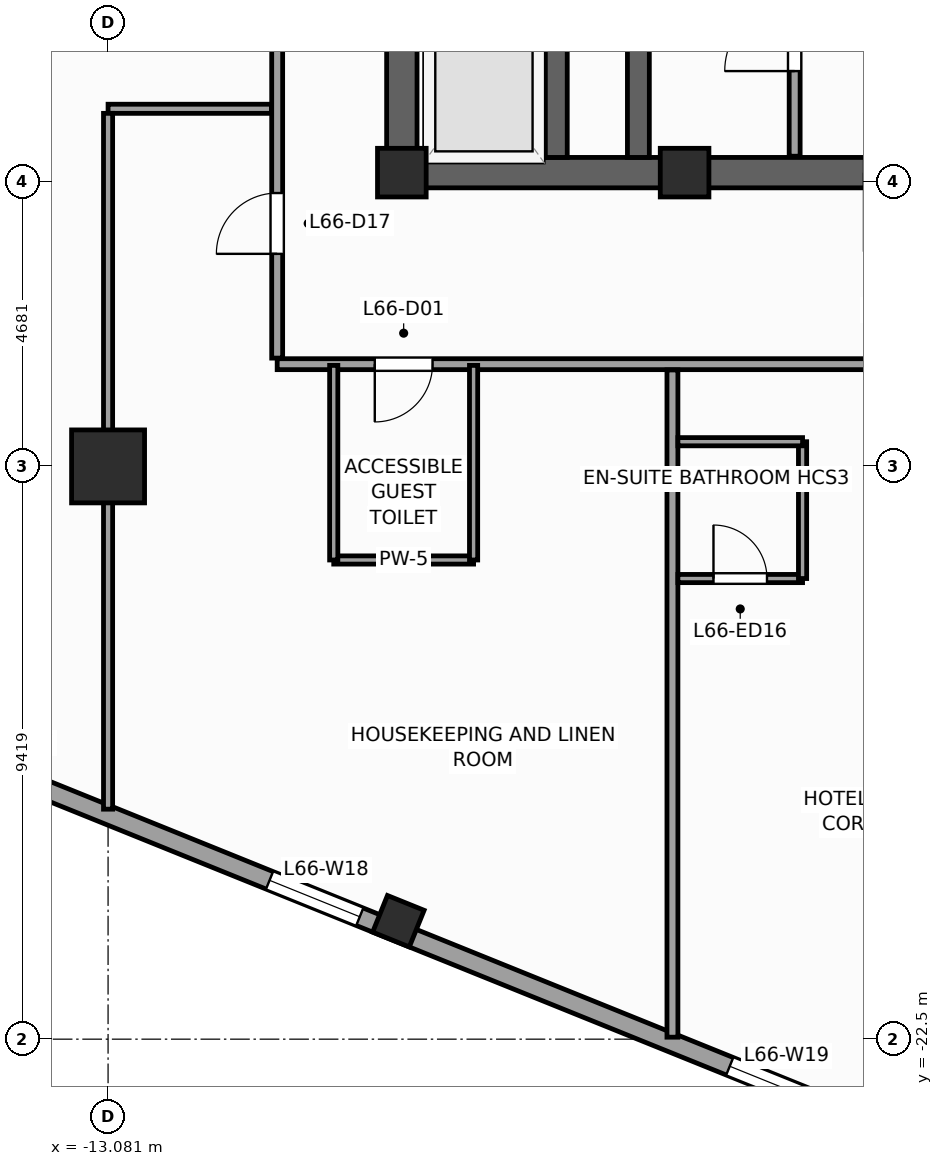
"""IFC4 building model, lengths in metres.
Left out: names, types, materials, properties, quantities, classifications, styles, units other than length and angle.
Written with IfcOpenShell. Run it as: python <this file> out.ifc"""

import sys

from ifc_helpers import new_model, si_unit, direction, frame, frame_2d, origin, origin_2d, place, context, subcontext, project, spatial, rectangle, extrude, source, transform, mapped, element, fill, save


model = new_model("IFC4")
c1 = context("Model", 3, precision=1e-05, world=origin(), true_north=direction((0.0, 1.0)))
c2 = subcontext(c1, "Body", "Model", "MODEL_VIEW")
j1 = project(units=[si_unit("LENGTHUNIT", "METRE"), si_unit("PLANEANGLEUNIT", "RADIAN")], contexts=[c1])
p1 = place(None, origin())
s1 = spatial("IfcSite", under=j1, at=p1, CompositionType="ELEMENT")
p2 = place(p1, origin())
s2 = spatial("IfcBuilding", under=s1, at=p2, CompositionType="ELEMENT")
p3 = place(p2, frame((0.0, 0.0, 272.4)))
s3 = spatial("IfcBuildingStorey", under=s2, at=p3, CompositionType="ELEMENT", Elevation=272.4)
p4 = place(p3, frame((-8.5, -8.25, 0.0), z_axis=(0.0, 0.0, 1.0), x_axis=(1.0, 0.0, 0.0)))
e1 = element("IfcWall", 1, at=p4, inside=s3, PredefinedType="SHEAR", context=c2, shape_type="SweptSolid", body=[
    extrude(rectangle(XDim=17.0, YDim=0.5, at=frame_2d((8.5, 0.0))), origin(), (0.0, 0.0, 1.0), 3.6),
])
p5 = place(p4, frame((7.85, 0.0, 0.0)))
e2 = element("IfcOpeningElement", 2, at=p5, cuts=e1, PredefinedType="OPENING", context=c2, shape_type="SweptSolid", body=[
    extrude(rectangle(XDim=1.3, YDim=2.2, at=frame_2d((0.65, 1.1))), frame((0.0, 0.26, 0.0), z_axis=(0.0, -1.0, 0.0), x_axis=(1.0, 0.0, 0.0)), (0.0, 0.0, 1.0), 0.52),
])
p6 = place(p3, frame((-8.25, -8.0, 0.0), z_axis=(0.0, 0.0, 1.0), x_axis=(0.0, 1.0, 0.0)))
e3 = element("IfcWall", 3, at=p6, inside=s3, PredefinedType="SHEAR", context=c2, shape_type="SweptSolid", body=[
    extrude(rectangle(XDim=16.0, YDim=0.5, at=frame_2d((8.0, 0.0))), origin(), (0.0, 0.0, 1.0), 3.6),
])
p7 = place(p6, frame((4.69, 0.0, 0.0)))
e4 = element("IfcOpeningElement", 4, at=p7, cuts=e3, PredefinedType="OPENING", context=c2, shape_type="SweptSolid", body=[
    extrude(rectangle(XDim=1.3, YDim=2.2, at=frame_2d((0.65, 1.1))), frame((0.0, 0.26, 0.0), z_axis=(0.0, -1.0, 0.0), x_axis=(1.0, 0.0, 0.0)), (0.0, 0.0, 1.0), 0.52),
])
p8 = place(p3, frame((-4.36, -8.0, 0.0), z_axis=(0.0, 0.0, 1.0), x_axis=(0.0, 1.0, 0.0)))
e5 = element("IfcWall", 5, at=p8, inside=s3, PredefinedType="SHEAR", context=c2, shape_type="SweptSolid", body=[
    extrude(rectangle(XDim=16.0, YDim=0.36, at=frame_2d((8.0, 0.0))), origin(), (0.0, 0.0, 1.0), 3.6),
])
p9 = place(p3, frame((-5.71, -8.0, 0.0), z_axis=(0.0, 0.0, 1.0), x_axis=(0.0, 1.0, 0.0)))
e6 = element("IfcWall", 6, at=p9, inside=s3, PredefinedType="SHEAR", context=c2, shape_type="SweptSolid", body=[
    extrude(rectangle(XDim=2.54, YDim=0.36, at=frame_2d((1.27, 0.0))), origin(), (0.0, 0.0, 1.0), 3.6),
])
m1 = source(origin(), c2, "Body", "SweptSolid", [
    extrude(rectangle(XDim=0.8, YDim=0.8, at=origin_2d()), origin(), (0.0, 0.0, 1.0), 3.6),
])
for number, where, z_axis, x_axis in (
    (7, (-8.25, -8.25, 0.0), (0.0, 0.0, 1.0), (1.0, 0.0, 0.0)),
    (8, (-3.6, -8.25, 0.0), (0.0, 0.0, 1.0), (1.0, 0.0, 0.0)),
):
    element("IfcColumn", number, at=place(p3, frame(where, z_axis=z_axis, x_axis=x_axis)), inside=s3, PredefinedType="PILASTER", context=c2, shape_type="MappedRepresentation", body=[
        mapped(m1, transform((0.0, 0.0, 0.0), scale=1.0)),
    ])
m2 = source(origin(), c2, "Body", "SweptSolid", [
    extrude(rectangle(XDim=1.2, YDim=1.2, at=origin_2d()), origin(), (0.0, 0.0, 1.0), 3.6),
])
p10 = place(p3, frame((-13.081, -13.081, 0.0), z_axis=(0.0, 0.0, 1.0), x_axis=(1.0, 0.0, 0.0)))
e9 = element("IfcColumn", 9, at=p10, inside=s3, PredefinedType="COLUMN", context=c2, shape_type="MappedRepresentation", body=[
    mapped(m2, transform((0.0, 0.0, 0.0), scale=1.0)),
])
m3 = source(origin(), c2, "Body", "SweptSolid", [
    extrude(rectangle(XDim=0.65, YDim=0.65, at=origin_2d()), origin(), (0.0, 0.0, 1.0), 3.6),
])
p11 = place(p3, frame((-8.307, -20.56, 0.0), z_axis=(0.0, 0.0, 1.0), x_axis=(0.374606593416, 0.927183854567, 0.0)))
e10 = element("IfcColumn", 10, at=p11, inside=s3, PredefinedType="COLUMN", context=c2, shape_type="MappedRepresentation", body=[
    mapped(m3, transform((0.0, 0.0, 0.0), scale=1.0)),
])
p12 = place(p3, frame((-23.813, -14.479, 0.0), z_axis=(0.0, 0.0, 1.0), x_axis=(0.927182657188, -0.374609557019, 0.0)))
e11 = element("IfcWall", 11, at=p12, inside=s3, PredefinedType="STANDARD", context=c2, shape_type="SweptSolid", body=[
    extrude(rectangle(XDim=33.31, YDim=0.31, at=frame_2d((16.655, 0.0))), origin(), (0.0, 0.0, 1.0), 2.75),
])
p13 = place(p12, frame((3.197, 0.0, 0.47)))
e12 = element("IfcOpeningElement", 12, at=p13, cuts=e11, PredefinedType="OPENING", context=c2, shape_type="SweptSolid", body=[
    extrude(rectangle(XDim=1.6, YDim=2.1, at=frame_2d((0.8, 1.05))), frame((0.0, 0.165, 0.0), z_axis=(0.0, -1.0, 0.0), x_axis=(1.0, 0.0, 0.0)), (0.0, 0.0, 1.0), 0.33),
])
p14 = place(p12, frame((8.86, 0.0, 0.47)))
e13 = element("IfcOpeningElement", 13, at=p14, cuts=e11, PredefinedType="OPENING", context=c2, shape_type="SweptSolid", body=[
    extrude(rectangle(XDim=1.6, YDim=2.1, at=frame_2d((0.8, 1.05))), frame((0.0, 0.165, 0.0), z_axis=(0.0, -1.0, 0.0), x_axis=(1.0, 0.0, 0.0)), (0.0, 0.0, 1.0), 0.33),
])
p15 = place(p12, frame((14.439, 0.0, 0.47)))
e14 = element("IfcOpeningElement", 14, at=p15, cuts=e11, PredefinedType="OPENING", context=c2, shape_type="SweptSolid", body=[
    extrude(rectangle(XDim=1.6, YDim=2.1, at=frame_2d((0.8, 1.05))), frame((0.0, 0.165, 0.0), z_axis=(0.0, -1.0, 0.0), x_axis=(1.0, 0.0, 0.0)), (0.0, 0.0, 1.0), 0.33),
])
p16 = place(p12, frame((22.601, 0.0, 0.47)))
e15 = element("IfcOpeningElement", 15, at=p16, cuts=e11, PredefinedType="OPENING", context=c2, shape_type="SweptSolid", body=[
    extrude(rectangle(XDim=1.6, YDim=2.1, at=frame_2d((0.8, 1.05))), frame((0.0, 0.165, 0.0), z_axis=(0.0, -1.0, 0.0), x_axis=(1.0, 0.0, 0.0)), (0.0, 0.0, 1.0), 0.33),
])
p17 = place(p12, frame((27.097, 0.0, 0.47)))
e16 = element("IfcOpeningElement", 16, at=p17, cuts=e11, PredefinedType="OPENING", context=c2, shape_type="SweptSolid", body=[
    extrude(rectangle(XDim=1.6, YDim=2.1, at=frame_2d((0.8, 1.05))), frame((0.0, 0.165, 0.0), z_axis=(0.0, -1.0, 0.0), x_axis=(1.0, 0.0, 0.0)), (0.0, 0.0, 1.0), 0.33),
])
p18 = place(p3, frame((-1.79, -7.98, 0.0), z_axis=(0.0, 0.0, 1.0), x_axis=(0.0, 1.0, 0.0)))
e17 = element("IfcWall", 17, at=p18, inside=s3, PredefinedType="PARTITIONING", context=c2, shape_type="SweptSolid", body=[
    extrude(rectangle(XDim=12.38, YDim=0.18, at=frame_2d((6.19, 0.0))), origin(), (0.0, 0.0, 1.0), 3.35),
])
p19 = place(p18, frame((8.8, 0.0, 0.0)))
e18 = element("IfcOpeningElement", 18, at=p19, cuts=e17, PredefinedType="OPENING", context=c2, shape_type="SweptSolid", body=[
    extrude(rectangle(XDim=1.1, YDim=2.2, at=frame_2d((0.55, 1.1))), frame((0.0, 0.1, 0.0), z_axis=(0.0, -1.0, 0.0), x_axis=(1.0, 0.0, 0.0)), (0.0, 0.0, 1.0), 0.2),
])
p20 = place(p18, frame((10.86, 0.0, 0.0)))
e19 = element("IfcOpeningElement", 19, at=p20, cuts=e17, PredefinedType="OPENING", context=c2, shape_type="SweptSolid", body=[
    extrude(rectangle(XDim=1.1, YDim=2.2, at=frame_2d((0.55, 1.1))), frame((0.0, 0.1, 0.0), z_axis=(0.0, -1.0, 0.0), x_axis=(1.0, 0.0, 0.0)), (0.0, 0.0, 1.0), 0.2),
])
p21 = place(p18, frame((1.4, 0.0, 0.0)))
e20 = element("IfcOpeningElement", 20, at=p21, cuts=e17, PredefinedType="OPENING", context=c2, shape_type="SweptSolid", body=[
    extrude(rectangle(XDim=1.15, YDim=2.25, at=frame_2d((0.575, 1.125))), frame((0.0, 0.1, 0.0), z_axis=(0.0, -1.0, 0.0), x_axis=(1.0, 0.0, 0.0)), (0.0, 0.0, 1.0), 0.2),
])
p22 = place(p18, frame((5.6, 0.0, 0.0)))
e21 = element("IfcOpeningElement", 21, at=p22, cuts=e17, PredefinedType="OPENING", context=c2, shape_type="SweptSolid", body=[
    extrude(rectangle(XDim=1.15, YDim=2.25, at=frame_2d((0.575, 1.125))), frame((0.0, 0.1, 0.0), z_axis=(0.0, -1.0, 0.0), x_axis=(1.0, 0.0, 0.0)), (0.0, 0.0, 1.0), 0.2),
])
p23 = place(p3, frame((-10.3, -11.4, 0.0), z_axis=(0.0, 0.0, 1.0), x_axis=(1.0, 0.0, 0.0)))
e22 = element("IfcWall", 22, at=p23, inside=s3, PredefinedType="PARTITIONING", context=c2, shape_type="SweptSolid", body=[
    extrude(rectangle(XDim=21.7, YDim=0.18, at=frame_2d((10.85, 0.0))), origin(), (0.0, 0.0, 1.0), 3.35),
])
p24 = place(p23, frame((1.605, 0.0, 0.0)))
e23 = element("IfcOpeningElement", 23, at=p24, cuts=e22, PredefinedType="OPENING", context=c2, shape_type="SweptSolid", body=[
    extrude(rectangle(XDim=0.95, YDim=2.1, at=frame_2d((0.475, 1.05))), frame((0.0, 0.1, 0.0), z_axis=(0.0, -1.0, 0.0), x_axis=(1.0, 0.0, 0.0)), (0.0, 0.0, 1.0), 0.2),
])
p25 = place(p23, frame((17.236, 0.0, 0.0)))
e24 = element("IfcOpeningElement", 24, at=p25, cuts=e22, PredefinedType="OPENING", context=c2, shape_type="SweptSolid", body=[
    extrude(rectangle(XDim=1.0, YDim=2.15, at=frame_2d((0.5, 1.075))), frame((0.0, 0.1, 0.0), z_axis=(0.0, -1.0, 0.0), x_axis=(1.0, 0.0, 0.0)), (0.0, 0.0, 1.0), 0.2),
])
p26 = place(p23, frame((9.8, 0.0, 0.0)))
e25 = element("IfcOpeningElement", 25, at=p26, cuts=e22, PredefinedType="OPENING", context=c2, shape_type="SweptSolid", body=[
    extrude(rectangle(XDim=1.0, YDim=2.15, at=frame_2d((0.5, 1.075))), frame((0.0, 0.1, 0.0), z_axis=(0.0, -1.0, 0.0), x_axis=(1.0, 0.0, 0.0)), (0.0, 0.0, 1.0), 0.2),
])
p27 = place(p3, frame((-10.3, -11.3, 0.0), z_axis=(0.0, 0.0, 1.0), x_axis=(0.0, 1.0, 0.0)))
e26 = element("IfcWall", 26, at=p27, inside=s3, PredefinedType="PARTITIONING", context=c2, shape_type="SweptSolid", body=[
    extrude(rectangle(XDim=21.5, YDim=0.18, at=frame_2d((10.75, 0.0))), origin(), (0.0, 0.0, 1.0), 3.35),
])
p28 = place(p27, frame((12.9, 0.0, 0.0)))
e27 = element("IfcOpeningElement", 27, at=p28, cuts=e26, PredefinedType="OPENING", context=c2, shape_type="SweptSolid", body=[
    extrude(rectangle(XDim=1.0, YDim=2.15, at=frame_2d((0.5, 1.075))), frame((0.0, 0.1, 0.0), z_axis=(0.0, -1.0, 0.0), x_axis=(1.0, 0.0, 0.0)), (0.0, 0.0, 1.0), 0.2),
])
p29 = place(p27, frame((17.736, 0.0, 0.0)))
e28 = element("IfcOpeningElement", 28, at=p29, cuts=e26, PredefinedType="OPENING", context=c2, shape_type="SweptSolid", body=[
    extrude(rectangle(XDim=1.0, YDim=2.15, at=frame_2d((0.5, 1.075))), frame((0.0, 0.1, 0.0), z_axis=(0.0, -1.0, 0.0), x_axis=(1.0, 0.0, 0.0)), (0.0, 0.0, 1.0), 0.2),
])
p30 = place(p27, frame((1.714, 0.0, 0.0)))
e29 = element("IfcOpeningElement", 29, at=p30, cuts=e26, PredefinedType="OPENING", context=c2, shape_type="SweptSolid", body=[
    extrude(rectangle(XDim=1.0, YDim=2.15, at=frame_2d((0.5, 1.075))), frame((0.0, 0.1, 0.0), z_axis=(0.0, -1.0, 0.0), x_axis=(1.0, 0.0, 0.0)), (0.0, 0.0, 1.0), 0.2),
])
p31 = place(p27, frame((5.4, 0.0, 0.0)))
e30 = element("IfcOpeningElement", 30, at=p31, cuts=e26, PredefinedType="OPENING", context=c2, shape_type="SweptSolid", body=[
    extrude(rectangle(XDim=1.0, YDim=2.15, at=frame_2d((0.5, 1.075))), frame((0.0, 0.1, 0.0), z_axis=(0.0, -1.0, 0.0), x_axis=(1.0, 0.0, 0.0)), (0.0, 0.0, 1.0), 0.2),
])
p32 = place(p27, frame((9.1, 0.0, 0.0)))
e31 = element("IfcOpeningElement", 31, at=p32, cuts=e26, PredefinedType="OPENING", context=c2, shape_type="SweptSolid", body=[
    extrude(rectangle(XDim=1.0, YDim=2.15, at=frame_2d((0.5, 1.075))), frame((0.0, 0.1, 0.0), z_axis=(0.0, -1.0, 0.0), x_axis=(1.0, 0.0, 0.0)), (0.0, 0.0, 1.0), 0.2),
])
p33 = place(p3, frame((-3.8, -11.495, 0.0), z_axis=(0.0, 0.0, 1.0), x_axis=(0.0, -1.0, 0.0)))
e32 = element("IfcWall", 32, at=p33, inside=s3, PredefinedType="PARTITIONING", context=c2, shape_type="SweptSolid", body=[
    extrude(rectangle(XDim=10.972, YDim=0.18, at=frame_2d((5.486, 0.0))), origin(), (0.0, 0.0, 1.0), 3.02),
])
p34 = place(p3, frame((-10.395, -7.2, 0.0), z_axis=(0.0, 0.0, 1.0), x_axis=(-1.0, 0.0, 0.0)))
e33 = element("IfcWall", 33, at=p34, inside=s3, PredefinedType="PARTITIONING", context=c2, shape_type="SweptSolid", body=[
    extrude(rectangle(XDim=2.686, YDim=0.15, at=frame_2d((1.343, 0.0))), origin(), (0.0, 0.0, 1.0), 3.35),
])
p35 = place(p3, frame((-13.081, -7.275, 0.0), z_axis=(0.0, 0.0, 1.0), x_axis=(0.0, -1.0, 0.0)))
e34 = element("IfcWall", 34, at=p35, inside=s3, PredefinedType="PARTITIONING", context=c2, shape_type="SweptSolid", body=[
    extrude(rectangle(XDim=11.443, YDim=0.15, at=frame_2d((5.721, 0.0))), origin(), (0.0, 0.0, 1.0), 2.45),
])
p36 = place(p3, frame((-9.37, -14.62, 0.0), z_axis=(0.0, 0.0, 1.0), x_axis=(1.0, 0.0, 0.0)))
e35 = element("IfcWall", 35, at=p36, inside=s3, PredefinedType="PARTITIONING", context=c2, shape_type="SweptSolid", body=[
    extrude(rectangle(XDim=2.3, YDim=0.135, at=frame_2d((1.15, 0.0))), origin(), (0.0, 0.0, 1.0), 2.95),
])
for number, where, z_axis, x_axis in (
    (36, (-7.07, -14.62, 0.0), (0.0, 0.0, 1.0), (0.0, 1.0, 0.0)),
    (37, (-9.37, -14.62, 0.0), (0.0, 0.0, 1.0), (0.0, 1.0, 0.0)),
):
    element("IfcWall", number, at=place(p3, frame(where, z_axis=z_axis, x_axis=x_axis)), inside=s3, PredefinedType="PARTITIONING", context=c2, shape_type="SweptSolid", body=[
        extrude(rectangle(XDim=3.2, YDim=0.135, at=frame_2d((1.6, 0.0))), origin(), (0.0, 0.0, 1.0), 3.35),
    ])
p37 = place(p3, frame((-3.71, -14.925, 0.0), z_axis=(0.0, 0.0, 1.0), x_axis=(1.0, 0.0, 0.0)))
e38 = element("IfcWall", 38, at=p37, inside=s3, PredefinedType="PARTITIONING", context=c2, shape_type="SweptSolid", body=[
    extrude(rectangle(XDim=2.05, YDim=0.135, at=frame_2d((1.025, 0.0))), origin(), (0.0, 0.0, 1.0), 3.35),
])
p38 = place(p37, frame((0.585, 0.0, 0.0)))
e39 = element("IfcOpeningElement", 39, at=p38, cuts=e38, PredefinedType="OPENING", context=c2, shape_type="SweptSolid", body=[
    extrude(rectangle(XDim=0.88, YDim=2.1, at=frame_2d((0.44, 1.05))), frame((0.0, 0.078, 0.0), z_axis=(0.0, -1.0, 0.0), x_axis=(1.0, 0.0, 0.0)), (0.0, 0.0, 1.0), 0.155),
])
p39 = place(p3, frame((-1.66, -14.925, 0.0), z_axis=(0.0, 0.0, 1.0), x_axis=(0.0, 1.0, 0.0)))
e40 = element("IfcWall", 40, at=p39, inside=s3, PredefinedType="PARTITIONING", context=c2, shape_type="SweptSolid", body=[
    extrude(rectangle(XDim=2.25, YDim=0.135, at=frame_2d((1.125, 0.0))), origin(), (0.0, 0.0, 1.0), 3.35),
])
p40 = place(p3, frame((-3.71, -12.675, 0.0), z_axis=(0.0, 0.0, 1.0), x_axis=(1.0, 0.0, 0.0)))
e41 = element("IfcWall", 41, at=p40, inside=s3, PredefinedType="PARTITIONING", context=c2, shape_type="SweptSolid", body=[
    extrude(rectangle(XDim=2.05, YDim=0.135, at=frame_2d((1.025, 0.0))), origin(), (0.0, 0.0, 1.0), 3.35),
])
m4 = source(origin(), c2, "Body", "SweptSolid", [
    extrude(rectangle(XDim=1.6, YDim=2.1, at=frame_2d((0.8, 1.05))), frame((0.0, 0.03, 0.0), z_axis=(0.0, -1.0, 0.0), x_axis=(1.0, 0.0, 0.0)), (0.0, 0.0, 1.0), 0.06),
])
p41 = place(p15, origin())
e42 = element("IfcWindow", 42, at=p41, inside=s3, PartitioningType="SINGLE_PANEL", PredefinedType="WINDOW", context=c2, shape_type="MappedRepresentation", body=[
    mapped(m4, transform((0.0, 0.0, 0.0), scale=1.0)),
])
fill(e14, e42)
p42 = place(p16, origin())
e43 = element("IfcWindow", 43, at=p42, inside=s3, PartitioningType="SINGLE_PANEL", PredefinedType="WINDOW", context=c2, shape_type="MappedRepresentation", body=[
    mapped(m4, transform((0.0, 0.0, 0.0), scale=1.0)),
])
fill(e15, e43)
m5 = source(origin(), c2, "Body", "SweptSolid", [
    extrude(rectangle(XDim=1.15, YDim=2.25, at=frame_2d((0.575, 1.125))), frame((0.0, 0.025, 0.0), z_axis=(0.0, -1.0, 0.0), x_axis=(1.0, 0.0, 0.0)), (0.0, 0.0, 1.0), 0.05),
])
p43 = place(p21, origin())
e44 = element("IfcDoor", 44, at=p43, inside=s3, OperationType="SINGLE_SWING_LEFT", PredefinedType="DOOR", context=c2, shape_type="MappedRepresentation", body=[
    mapped(m5, transform((0.0, 0.0, 0.0), scale=1.0)),
])
fill(e20, e44)
m6 = source(origin(), c2, "Body", "SweptSolid", [
    extrude(rectangle(XDim=0.95, YDim=2.1, at=frame_2d((0.475, 1.05))), frame((0.0, 0.025, 0.0), z_axis=(0.0, -1.0, 0.0), x_axis=(1.0, 0.0, 0.0)), (0.0, 0.0, 1.0), 0.05),
])
p44 = place(p24, frame((0.95, 0.0, 0.0), z_axis=(0.0, 0.0, 1.0), x_axis=(-1.0, 0.0, 0.0)))
e45 = element("IfcDoor", 45, at=p44, inside=s3, OperationType="SINGLE_SWING_LEFT", PredefinedType="DOOR", context=c2, shape_type="MappedRepresentation", body=[
    mapped(m6, transform((0.0, 0.0, 0.0), scale=1.0)),
])
fill(e23, e45)
m7 = source(origin(), c2, "Body", "SweptSolid", [
    extrude(rectangle(XDim=0.88, YDim=2.1, at=frame_2d((0.44, 1.05))), frame((0.0, 0.025, 0.0), z_axis=(0.0, -1.0, 0.0), x_axis=(1.0, 0.0, 0.0)), (0.0, 0.0, 1.0), 0.05),
])
p45 = place(p38, origin())
e46 = element("IfcDoor", 46, at=p45, inside=s3, OperationType="SINGLE_SWING_LEFT", PredefinedType="DOOR", context=c2, shape_type="MappedRepresentation", body=[
    mapped(m7, transform((0.0, 0.0, 0.0), scale=1.0)),
])
fill(e39, e46)
m8 = source(origin(), c2, "Body", "SweptSolid", [
    extrude(rectangle(XDim=1.0, YDim=2.15, at=frame_2d((0.5, 1.075))), frame((0.0, 0.025, 0.0), z_axis=(0.0, -1.0, 0.0), x_axis=(1.0, 0.0, 0.0)), (0.0, 0.0, 1.0), 0.05),
])
p46 = place(p30, origin())
e47 = element("IfcDoor", 47, at=p46, inside=s3, OperationType="SINGLE_SWING_LEFT", PredefinedType="DOOR", context=c2, shape_type="MappedRepresentation", body=[
    mapped(m8, transform((0.0, 0.0, 0.0), scale=1.0)),
])
fill(e29, e47)
save(model, sys.argv[1])
